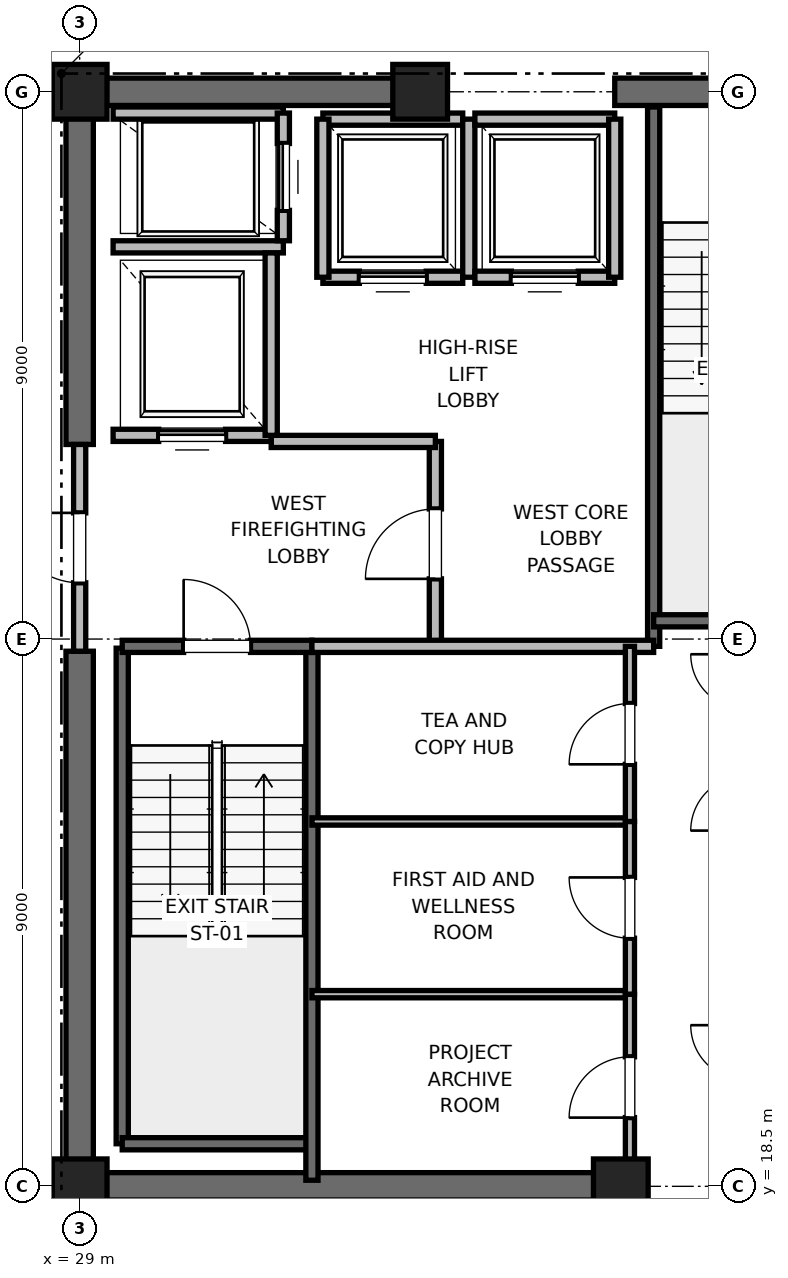
"""IFC4 building model, lengths in metres.
Left out: names, types, materials, properties, quantities, classifications, styles, units other than length and angle.
Written with IfcOpenShell. Run it as: python <this file> out.ifc"""

import sys

from ifc_helpers import new_model, si_unit, direction, frame, frame_2d, origin, origin_2d, place, context, subcontext, project, spatial, rectangle, extrude, element, fill, save


model = new_model("IFC4")
c1 = context("Model", 3, precision=1e-05, world=origin(), true_north=direction((0.0, 1.0)))
c2 = subcontext(c1, "Body", "Model", "MODEL_VIEW")
j1 = project(units=[si_unit("LENGTHUNIT", "METRE"), si_unit("PLANEANGLEUNIT", "RADIAN")], contexts=[c1])
p1 = place(None, origin())
s1 = spatial("IfcSite", under=j1, at=p1, CompositionType="ELEMENT")
p2 = place(p1, origin())
s2 = spatial("IfcBuilding", under=s1, at=p2, CompositionType="ELEMENT")
p3 = place(p2, frame((0.0, 0.0, 247.2)))
s3 = spatial("IfcBuildingStorey", under=s2, at=p3, CompositionType="ELEMENT", Elevation=247.2)
for number, where, z_axis, x_axis in (
    (1, (29.0, 18.5, 0.0), (0.0, 0.0, 1.0), (1.0, 0.0, 0.0)),
    (2, (29.0, 36.5, 0.0), (0.0, 0.0, 1.0), (1.0, 0.0, 0.0)),
    (3, (37.9, 18.5, 0.0), (0.0, 0.0, 1.0), (1.0, 0.0, 0.0)),
    (4, (34.6, 36.5, 0.0), (0.0, 0.0, 1.0), (1.0, 0.0, 0.0)),
):
    element("IfcColumn", number, at=place(p3, frame(where, z_axis=z_axis, x_axis=x_axis)), inside=s3, PredefinedType="PILASTER", context=c2, shape_type="SweptSolid", body=[
        extrude(rectangle(XDim=0.9, YDim=0.9, at=origin_2d()), origin(), (0.0, 0.0, 1.0), 4.0),
    ])
p4 = place(p3, frame((29.0, 18.5, 0.0), z_axis=(0.0, 0.0, 1.0), x_axis=(1.0, 0.0, 0.0)))
e5 = element("IfcWall", 5, at=p4, inside=s3, PredefinedType="SHEAR", context=c2, shape_type="SweptSolid", body=[
    extrude(rectangle(XDim=9.2, YDim=0.45, at=frame_2d((4.6, 0.0))), origin(), (0.0, 0.0, 1.0), 3.785),
])
p5 = place(p3, frame((29.0, 36.5, 0.0), z_axis=(0.0, 0.0, 1.0), x_axis=(1.0, 0.0, 0.0)))
e6 = element("IfcWall", 6, at=p5, inside=s3, PredefinedType="SHEAR", context=c2, shape_type="SweptSolid", body=[
    extrude(rectangle(XDim=5.8, YDim=0.45, at=frame_2d((2.9, 0.0))), origin(), (0.0, 0.0, 1.0), 3.785),
])
p6 = place(p3, frame((37.8, 36.5, 0.0), z_axis=(0.0, 0.0, 1.0), x_axis=(1.0, 0.0, 0.0)))
e7 = element("IfcWall", 7, at=p6, inside=s3, PredefinedType="SHEAR", context=c2, shape_type="SweptSolid", body=[
    extrude(rectangle(XDim=4.4, YDim=0.45, at=frame_2d((2.2, 0.0))), origin(), (0.0, 0.0, 1.0), 3.785),
])
p7 = place(p6, frame((1.65, 0.0, 0.0)))
e8 = element("IfcOpeningElement", 8, at=p7, cuts=e7, PredefinedType="OPENING", context=c2, shape_type="SweptSolid", body=[
    extrude(rectangle(XDim=1.1, YDim=2.15, at=frame_2d((0.55, 1.075))), frame((0.0, 0.225, 0.0), z_axis=(0.0, -1.0, 0.0), x_axis=(1.0, 0.0, 0.0)), (0.0, 0.0, 1.0), 0.45),
])
p8 = place(p3, frame((29.0, 18.5, 0.0), z_axis=(0.0, 0.0, 1.0), x_axis=(0.0, 1.0, 0.0)))
e9 = element("IfcWall", 9, at=p8, inside=s3, PredefinedType="SHEAR", context=c2, shape_type="SweptSolid", body=[
    extrude(rectangle(XDim=8.8, YDim=0.45, at=frame_2d((4.4, 0.0))), origin(), (0.0, 0.0, 1.0), 3.785),
])
p9 = place(p3, frame((29.0, 30.7, 0.0), z_axis=(0.0, 0.0, 1.0), x_axis=(0.0, 1.0, 0.0)))
e10 = element("IfcWall", 10, at=p9, inside=s3, PredefinedType="SHEAR", context=c2, shape_type="SweptSolid", body=[
    extrude(rectangle(XDim=5.8, YDim=0.45, at=frame_2d((2.9, 0.0))), origin(), (0.0, 0.0, 1.0), 3.785),
])
p10 = place(p3, frame((29.7, 19.2, 0.0), z_axis=(0.0, 0.0, 1.0), x_axis=(0.0, 1.0, 0.0)))
e11 = element("IfcWall", 11, at=p10, inside=s3, PredefinedType="SOLIDWALL", context=c2, shape_type="SweptSolid", body=[
    extrude(rectangle(XDim=8.15, YDim=0.2, at=frame_2d((4.075, 0.0))), origin(), (0.0, 0.0, 1.0), 3.785),
])
p11 = place(p3, frame((29.7, 19.2, 0.0), z_axis=(0.0, 0.0, 1.0), x_axis=(1.0, 0.0, 0.0)))
e12 = element("IfcWall", 12, at=p11, inside=s3, PredefinedType="SOLIDWALL", context=c2, shape_type="SweptSolid", body=[
    extrude(rectangle(XDim=3.12, YDim=0.2, at=frame_2d((1.56, 0.0))), origin(), (0.0, 0.0, 1.0), 3.785),
])
p12 = place(p3, frame((32.82, 18.6, 0.0), z_axis=(0.0, 0.0, 1.0), x_axis=(0.0, 1.0, 0.0)))
e13 = element("IfcWall", 13, at=p12, inside=s3, PredefinedType="SOLIDWALL", context=c2, shape_type="SweptSolid", body=[
    extrude(rectangle(XDim=8.78, YDim=0.2, at=frame_2d((4.39, 0.0))), origin(), (0.0, 0.0, 1.0), 3.785),
])
p13 = place(p3, frame((29.7, 27.38, 0.0), z_axis=(0.0, 0.0, 1.0), x_axis=(1.0, 0.0, 0.0)))
e14 = element("IfcWall", 14, at=p13, inside=s3, PredefinedType="SOLIDWALL", context=c2, shape_type="SweptSolid", body=[
    extrude(rectangle(XDim=3.12, YDim=0.2, at=frame_2d((1.56, 0.0))), origin(), (0.0, 0.0, 1.0), 3.785),
])
p14 = place(p13, frame((1.01, 0.0, 0.0)))
e15 = element("IfcOpeningElement", 15, at=p14, cuts=e14, PredefinedType="OPENING", context=c2, shape_type="SweptSolid", body=[
    extrude(rectangle(XDim=1.1, YDim=2.15, at=frame_2d((0.55, 1.075))), frame((0.0, 0.1, 0.0), z_axis=(0.0, -1.0, 0.0), x_axis=(1.0, 0.0, 0.0)), (0.0, 0.0, 1.0), 0.2),
])
p15 = place(p3, frame((38.44, 27.38, 0.0), z_axis=(0.0, 0.0, 1.0), x_axis=(0.0, 1.0, 0.0)))
e16 = element("IfcWall", 16, at=p15, inside=s3, PredefinedType="SOLIDWALL", context=c2, shape_type="SweptSolid", body=[
    extrude(rectangle(XDim=8.87, YDim=0.2, at=frame_2d((4.435, 0.0))), origin(), (0.0, 0.0, 1.0), 3.785),
])
p16 = place(p3, frame((38.44, 27.8, 0.0), z_axis=(0.0, 0.0, 1.0), x_axis=(1.0, 0.0, 0.0)))
e17 = element("IfcWall", 17, at=p16, inside=s3, PredefinedType="SOLIDWALL", context=c2, shape_type="SweptSolid", body=[
    extrude(rectangle(XDim=3.32, YDim=0.2, at=frame_2d((1.66, 0.0))), origin(), (0.0, 0.0, 1.0), 3.785),
])
p17 = place(p3, frame((34.85, 27.38, 0.0), z_axis=(0.0, 0.0, 1.0), x_axis=(0.0, 1.0, 0.0)))
e18 = element("IfcWall", 18, at=p17, inside=s3, PredefinedType="PARTITIONING", context=c2, shape_type="SweptSolid", body=[
    extrude(rectangle(XDim=3.37, YDim=0.2, at=frame_2d((1.685, 0.0))), origin(), (0.0, 0.0, 1.0), 3.785),
])
p18 = place(p17, frame((1.11, 0.0, 0.0)))
e19 = element("IfcOpeningElement", 19, at=p18, cuts=e18, PredefinedType="OPENING", context=c2, shape_type="SweptSolid", body=[
    extrude(rectangle(XDim=1.15, YDim=2.2, at=frame_2d((0.575, 1.1))), frame((0.0, 0.1, 0.0), z_axis=(0.0, -1.0, 0.0), x_axis=(1.0, 0.0, 0.0)), (0.0, 0.0, 1.0), 0.2),
])
p19 = place(p3, frame((29.0, 27.3, 0.0), z_axis=(0.0, 0.0, 1.0), x_axis=(0.0, 1.0, 0.0)))
e20 = element("IfcWall", 20, at=p19, inside=s3, PredefinedType="PARTITIONING", context=c2, shape_type="SweptSolid", body=[
    extrude(rectangle(XDim=3.4, YDim=0.2, at=frame_2d((1.7, 0.0))), origin(), (0.0, 0.0, 1.0), 2.865),
])
p20 = place(p19, frame((1.125, 0.0, 0.0)))
e21 = element("IfcOpeningElement", 21, at=p20, cuts=e20, PredefinedType="OPENING", context=c2, shape_type="SweptSolid", body=[
    extrude(rectangle(XDim=1.15, YDim=2.2, at=frame_2d((0.575, 1.1))), frame((0.0, 0.1, 0.0), z_axis=(0.0, -1.0, 0.0), x_axis=(1.0, 0.0, 0.0)), (0.0, 0.0, 1.0), 0.2),
])
p21 = place(p3, frame((32.82, 27.38, 0.0), z_axis=(0.0, 0.0, 1.0), x_axis=(1.0, 0.0, 0.0)))
e22 = element("IfcWall", 22, at=p21, inside=s3, PredefinedType="PARTITIONING", context=c2, shape_type="SweptSolid", body=[
    extrude(rectangle(XDim=5.62, YDim=0.2, at=frame_2d((2.81, 0.0))), origin(), (0.0, 0.0, 1.0), 3.785),
])
p22 = place(p3, frame((32.15, 30.75, 0.0), z_axis=(0.0, 0.0, 1.0), x_axis=(1.0, 0.0, 0.0)))
e23 = element("IfcWall", 23, at=p22, inside=s3, PredefinedType="PARTITIONING", context=c2, shape_type="SweptSolid", body=[
    extrude(rectangle(XDim=2.7, YDim=0.2, at=frame_2d((1.35, 0.0))), origin(), (0.0, 0.0, 1.0), 3.785),
])
p23 = place(p3, frame((29.55, 30.85, 0.0), z_axis=(0.0, 0.0, 1.0), x_axis=(1.0, 0.0, 0.0)))
e24 = element("IfcWall", 24, at=p23, inside=s3, PredefinedType="SOLIDWALL", context=c2, shape_type="SweptSolid", body=[
    extrude(rectangle(XDim=2.6, YDim=0.2, at=frame_2d((1.3, 0.0))), origin(), (0.0, 0.0, 1.0), 2.865),
])
p24 = place(p23, frame((0.75, 0.0, 0.0)))
e25 = element("IfcOpeningElement", 25, at=p24, cuts=e24, PredefinedType="OPENING", context=c2, shape_type="SweptSolid", body=[
    extrude(rectangle(XDim=1.1, YDim=2.2, at=frame_2d((0.55, 1.1))), frame((0.0, 0.1, 0.0), z_axis=(0.0, -1.0, 0.0), x_axis=(1.0, 0.0, 0.0)), (0.0, 0.0, 1.0), 0.2),
])
p25 = place(p3, frame((29.55, 33.95, 0.0), z_axis=(0.0, 0.0, 1.0), x_axis=(1.0, 0.0, 0.0)))
e26 = element("IfcWall", 26, at=p25, inside=s3, PredefinedType="SOLIDWALL", context=c2, shape_type="SweptSolid", body=[
    extrude(rectangle(XDim=2.8, YDim=0.2, at=frame_2d((1.4, 0.0))), origin(), (0.0, 0.0, 1.0), 3.785),
])
p26 = place(p3, frame((32.15, 30.85, 0.0), z_axis=(0.0, 0.0, 1.0), x_axis=(0.0, 1.0, 0.0)))
e27 = element("IfcWall", 27, at=p26, inside=s3, PredefinedType="SOLIDWALL", context=c2, shape_type="SweptSolid", body=[
    extrude(rectangle(XDim=3.0, YDim=0.2, at=frame_2d((1.5, 0.0))), origin(), (0.0, 0.0, 1.0), 3.785),
])
p27 = place(p3, frame((32.35, 36.15, 0.0), z_axis=(0.0, 0.0, 1.0), x_axis=(-1.0, 0.0, 0.0)))
e28 = element("IfcWall", 28, at=p27, inside=s3, PredefinedType="SOLIDWALL", context=c2, shape_type="SweptSolid", body=[
    extrude(rectangle(XDim=2.8, YDim=0.2, at=frame_2d((1.4, 0.0))), origin(), (0.0, 0.0, 1.0), 3.148),
])
p28 = place(p3, frame((32.35, 34.05, 0.0), z_axis=(0.0, 0.0, 1.0), x_axis=(0.0, 1.0, 0.0)))
e29 = element("IfcWall", 29, at=p28, inside=s3, PredefinedType="SOLIDWALL", context=c2, shape_type="SweptSolid", body=[
    extrude(rectangle(XDim=2.1, YDim=0.2, at=frame_2d((1.05, 0.0))), origin(), (0.0, 0.0, 1.0), 3.785),
])
p29 = place(p28, frame((0.5, 0.0, 0.0)))
e30 = element("IfcOpeningElement", 30, at=p29, cuts=e29, PredefinedType="OPENING", context=c2, shape_type="SweptSolid", body=[
    extrude(rectangle(XDim=1.1, YDim=2.2, at=frame_2d((0.55, 1.1))), frame((0.0, 0.1, 0.0), z_axis=(0.0, -1.0, 0.0), x_axis=(1.0, 0.0, 0.0)), (0.0, 0.0, 1.0), 0.2),
])
p30 = place(p3, frame((33.0, 33.45, 0.0), z_axis=(0.0, 0.0, 1.0), x_axis=(1.0, 0.0, 0.0)))
e31 = element("IfcWall", 31, at=p30, inside=s3, PredefinedType="SOLIDWALL", context=c2, shape_type="SweptSolid", body=[
    extrude(rectangle(XDim=2.3, YDim=0.2, at=frame_2d((1.15, 0.0))), origin(), (0.0, 0.0, 1.0), 3.785),
])
p31 = place(p30, frame((0.6, 0.0, 0.0)))
e32 = element("IfcOpeningElement", 32, at=p31, cuts=e31, PredefinedType="OPENING", context=c2, shape_type="SweptSolid", body=[
    extrude(rectangle(XDim=1.1, YDim=2.2, at=frame_2d((0.55, 1.1))), frame((0.0, 0.1, 0.0), z_axis=(0.0, -1.0, 0.0), x_axis=(1.0, 0.0, 0.0)), (0.0, 0.0, 1.0), 0.2),
])
p32 = place(p3, frame((35.3, 36.05, 0.0), z_axis=(0.0, 0.0, 1.0), x_axis=(-1.0, 0.0, 0.0)))
e33 = element("IfcWall", 33, at=p32, inside=s3, PredefinedType="SOLIDWALL", context=c2, shape_type="SweptSolid", body=[
    extrude(rectangle(XDim=2.3, YDim=0.2, at=frame_2d((1.15, 0.0))), origin(), (0.0, 0.0, 1.0), 2.865),
])
p33 = place(p3, frame((33.0, 36.05, 0.0), z_axis=(0.0, 0.0, 1.0), x_axis=(0.0, -1.0, 0.0)))
e34 = element("IfcWall", 34, at=p33, inside=s3, PredefinedType="SOLIDWALL", context=c2, shape_type="SweptSolid", body=[
    extrude(rectangle(XDim=2.6, YDim=0.2, at=frame_2d((1.3, 0.0))), origin(), (0.0, 0.0, 1.0), 3.785),
])
p34 = place(p3, frame((35.4, 33.45, 0.0), z_axis=(0.0, 0.0, 1.0), x_axis=(0.0, 1.0, 0.0)))
e35 = element("IfcWall", 35, at=p34, inside=s3, PredefinedType="SOLIDWALL", context=c2, shape_type="SweptSolid", body=[
    extrude(rectangle(XDim=2.6, YDim=0.2, at=frame_2d((1.3, 0.0))), origin(), (0.0, 0.0, 1.0), 2.865),
])
p35 = place(p3, frame((35.5, 33.45, 0.0), z_axis=(0.0, 0.0, 1.0), x_axis=(1.0, 0.0, 0.0)))
e36 = element("IfcWall", 36, at=p35, inside=s3, PredefinedType="SOLIDWALL", context=c2, shape_type="SweptSolid", body=[
    extrude(rectangle(XDim=2.3, YDim=0.2, at=frame_2d((1.15, 0.0))), origin(), (0.0, 0.0, 1.0), 3.785),
])
p36 = place(p35, frame((0.6, 0.0, 0.0)))
e37 = element("IfcOpeningElement", 37, at=p36, cuts=e36, PredefinedType="OPENING", context=c2, shape_type="SweptSolid", body=[
    extrude(rectangle(XDim=1.1, YDim=2.2, at=frame_2d((0.55, 1.1))), frame((0.0, 0.1, 0.0), z_axis=(0.0, -1.0, 0.0), x_axis=(1.0, 0.0, 0.0)), (0.0, 0.0, 1.0), 0.2),
])
p37 = place(p3, frame((37.8, 36.05, 0.0), z_axis=(0.0, 0.0, 1.0), x_axis=(-1.0, 0.0, 0.0)))
e38 = element("IfcWall", 38, at=p37, inside=s3, PredefinedType="SOLIDWALL", context=c2, shape_type="SweptSolid", body=[
    extrude(rectangle(XDim=2.3, YDim=0.2, at=frame_2d((1.15, 0.0))), origin(), (0.0, 0.0, 1.0), 2.865),
])
p38 = place(p3, frame((37.8, 33.45, 0.0), z_axis=(0.0, 0.0, 1.0), x_axis=(0.0, 1.0, 0.0)))
e39 = element("IfcWall", 39, at=p38, inside=s3, PredefinedType="SOLIDWALL", context=c2, shape_type="SweptSolid", body=[
    extrude(rectangle(XDim=2.6, YDim=0.2, at=frame_2d((1.3, 0.0))), origin(), (0.0, 0.0, 1.0), 2.865),
])
for number, where, z_axis, x_axis in (
    (40, (32.82, 21.66, 0.0), (0.0, 0.0, 1.0), (1.0, 0.0, 0.0)),
    (41, (32.82, 24.5, 0.0), (0.0, 0.0, 1.0), (1.0, 0.0, 0.0)),
):
    element("IfcWall", number, at=place(p3, frame(where, z_axis=z_axis, x_axis=x_axis)), inside=s3, PredefinedType="PARTITIONING", context=c2, shape_type="SweptSolid", body=[
        extrude(rectangle(XDim=5.23, YDim=0.12, at=frame_2d((2.615, 0.0))), origin(), (0.0, 0.0, 1.0), 2.85),
    ])
p39 = place(p3, frame((38.05, 18.6, 0.0), z_axis=(0.0, 0.0, 1.0), x_axis=(0.0, 1.0, 0.0)))
e42 = element("IfcWall", 42, at=p39, inside=s3, PredefinedType="PARTITIONING", context=c2, shape_type="SweptSolid", body=[
    extrude(rectangle(XDim=3.06, YDim=0.15, at=frame_2d((1.53, 0.0))), origin(), (0.0, 0.0, 1.0), 2.85),
])
p40 = place(p39, frame((1.03, 0.0, 0.0)))
e43 = element("IfcOpeningElement", 43, at=p40, cuts=e42, PredefinedType="OPENING", context=c2, shape_type="SweptSolid", body=[
    extrude(rectangle(XDim=1.0, YDim=2.15, at=frame_2d((0.5, 1.075))), frame((0.0, 0.075, 0.0), z_axis=(0.0, -1.0, 0.0), x_axis=(1.0, 0.0, 0.0)), (0.0, 0.0, 1.0), 0.15),
])
p41 = place(p3, frame((38.05, 21.66, 0.0), z_axis=(0.0, 0.0, 1.0), x_axis=(0.0, 1.0, 0.0)))
e44 = element("IfcWall", 44, at=p41, inside=s3, PredefinedType="PARTITIONING", context=c2, shape_type="SweptSolid", body=[
    extrude(rectangle(XDim=2.84, YDim=0.15, at=frame_2d((1.42, 0.0))), origin(), (0.0, 0.0, 1.0), 2.85),
])
p42 = place(p41, frame((0.92, 0.0, 0.0)))
e45 = element("IfcOpeningElement", 45, at=p42, cuts=e44, PredefinedType="OPENING", context=c2, shape_type="SweptSolid", body=[
    extrude(rectangle(XDim=1.0, YDim=2.15, at=frame_2d((0.5, 1.075))), frame((0.0, 0.075, 0.0), z_axis=(0.0, -1.0, 0.0), x_axis=(1.0, 0.0, 0.0)), (0.0, 0.0, 1.0), 0.15),
])
p43 = place(p3, frame((38.05, 24.5, 0.0), z_axis=(0.0, 0.0, 1.0), x_axis=(0.0, 1.0, 0.0)))
e46 = element("IfcWall", 46, at=p43, inside=s3, PredefinedType="PARTITIONING", context=c2, shape_type="SweptSolid", body=[
    extrude(rectangle(XDim=2.88, YDim=0.15, at=frame_2d((1.44, 0.0))), origin(), (0.0, 0.0, 1.0), 2.85),
])
p44 = place(p43, frame((0.94, 0.0, 0.0)))
e47 = element("IfcOpeningElement", 47, at=p44, cuts=e46, PredefinedType="OPENING", context=c2, shape_type="SweptSolid", body=[
    extrude(rectangle(XDim=1.0, YDim=2.15, at=frame_2d((0.5, 1.075))), frame((0.0, 0.075, 0.0), z_axis=(0.0, -1.0, 0.0), x_axis=(1.0, 0.0, 0.0)), (0.0, 0.0, 1.0), 0.15),
])
p45 = place(p14, origin())
e48 = element("IfcDoor", 48, at=p45, inside=s3, OperationType="SINGLE_SWING_LEFT", PredefinedType="DOOR", context=c2, shape_type="SweptSolid", body=[
    extrude(rectangle(XDim=1.1, YDim=2.15, at=frame_2d((0.55, 1.075))), frame((0.0, 0.025, 0.0), z_axis=(0.0, -1.0, 0.0), x_axis=(1.0, 0.0, 0.0)), (0.0, 0.0, 1.0), 0.05),
])
fill(e15, e48)
p46 = place(p18, origin())
e49 = element("IfcDoor", 49, at=p46, inside=s3, OperationType="SINGLE_SWING_LEFT", PredefinedType="DOOR", context=c2, shape_type="SweptSolid", body=[
    extrude(rectangle(XDim=1.15, YDim=2.2, at=frame_2d((0.575, 1.1))), frame((0.0, 0.025, 0.0), z_axis=(0.0, -1.0, 0.0), x_axis=(1.0, 0.0, 0.0)), (0.0, 0.0, 1.0), 0.05),
])
fill(e19, e49)
p47 = place(p20, origin())
e50 = element("IfcDoor", 50, at=p47, inside=s3, OperationType="SINGLE_SWING_RIGHT", PredefinedType="DOOR", context=c2, shape_type="SweptSolid", body=[
    extrude(rectangle(XDim=1.15, YDim=2.2, at=frame_2d((0.575, 1.1))), frame((0.0, 0.025, 0.0), z_axis=(0.0, -1.0, 0.0), x_axis=(1.0, 0.0, 0.0)), (0.0, 0.0, 1.0), 0.05),
])
fill(e21, e50)
p48 = place(p24, origin())
e51 = element("IfcDoor", 51, at=p48, inside=s3, OperationType="SLIDING_TO_RIGHT", PredefinedType="DOOR", context=c2, shape_type="SweptSolid", body=[
    extrude(rectangle(XDim=1.1, YDim=2.2, at=frame_2d((0.55, 1.1))), frame((0.0, 0.025, 0.0), z_axis=(0.0, -1.0, 0.0), x_axis=(1.0, 0.0, 0.0)), (0.0, 0.0, 1.0), 0.05),
])
fill(e25, e51)
p49 = place(p29, origin())
e52 = element("IfcDoor", 52, at=p49, inside=s3, OperationType="SLIDING_TO_RIGHT", PredefinedType="DOOR", context=c2, shape_type="SweptSolid", body=[
    extrude(rectangle(XDim=1.1, YDim=2.2, at=frame_2d((0.55, 1.1))), frame((0.0, 0.025, 0.0), z_axis=(0.0, -1.0, 0.0), x_axis=(1.0, 0.0, 0.0)), (0.0, 0.0, 1.0), 0.05),
])
fill(e30, e52)
p50 = place(p31, origin())
e53 = element("IfcDoor", 53, at=p50, inside=s3, OperationType="SLIDING_TO_RIGHT", PredefinedType="DOOR", context=c2, shape_type="SweptSolid", body=[
    extrude(rectangle(XDim=1.1, YDim=2.2, at=frame_2d((0.55, 1.1))), frame((0.0, 0.025, 0.0), z_axis=(0.0, -1.0, 0.0), x_axis=(1.0, 0.0, 0.0)), (0.0, 0.0, 1.0), 0.05),
])
fill(e32, e53)
p51 = place(p36, origin())
e54 = element("IfcDoor", 54, at=p51, inside=s3, OperationType="SLIDING_TO_RIGHT", PredefinedType="DOOR", context=c2, shape_type="SweptSolid", body=[
    extrude(rectangle(XDim=1.1, YDim=2.2, at=frame_2d((0.55, 1.1))), frame((0.0, 0.025, 0.0), z_axis=(0.0, -1.0, 0.0), x_axis=(1.0, 0.0, 0.0)), (0.0, 0.0, 1.0), 0.05),
])
fill(e37, e54)
p52 = place(p40, origin())
e55 = element("IfcDoor", 55, at=p52, inside=s3, OperationType="SINGLE_SWING_LEFT", PredefinedType="DOOR", context=c2, shape_type="SweptSolid", body=[
    extrude(rectangle(XDim=1.0, YDim=2.15, at=frame_2d((0.5, 1.075))), frame((0.0, 0.025, 0.0), z_axis=(0.0, -1.0, 0.0), x_axis=(1.0, 0.0, 0.0)), (0.0, 0.0, 1.0), 0.05),
])
fill(e43, e55)
p53 = place(p42, origin())
e56 = element("IfcDoor", 56, at=p53, inside=s3, OperationType="SINGLE_SWING_RIGHT", PredefinedType="DOOR", context=c2, shape_type="SweptSolid", body=[
    extrude(rectangle(XDim=1.0, YDim=2.15, at=frame_2d((0.5, 1.075))), frame((0.0, 0.025, 0.0), z_axis=(0.0, -1.0, 0.0), x_axis=(1.0, 0.0, 0.0)), (0.0, 0.0, 1.0), 0.05),
])
fill(e45, e56)
p54 = place(p44, origin())
e57 = element("IfcDoor", 57, at=p54, inside=s3, OperationType="SINGLE_SWING_LEFT", PredefinedType="DOOR", context=c2, shape_type="SweptSolid", body=[
    extrude(rectangle(XDim=1.0, YDim=2.15, at=frame_2d((0.5, 1.075))), frame((0.0, 0.025, 0.0), z_axis=(0.0, -1.0, 0.0), x_axis=(1.0, 0.0, 0.0)), (0.0, 0.0, 1.0), 0.05),
])
fill(e47, e57)
save(model, sys.argv[1])
